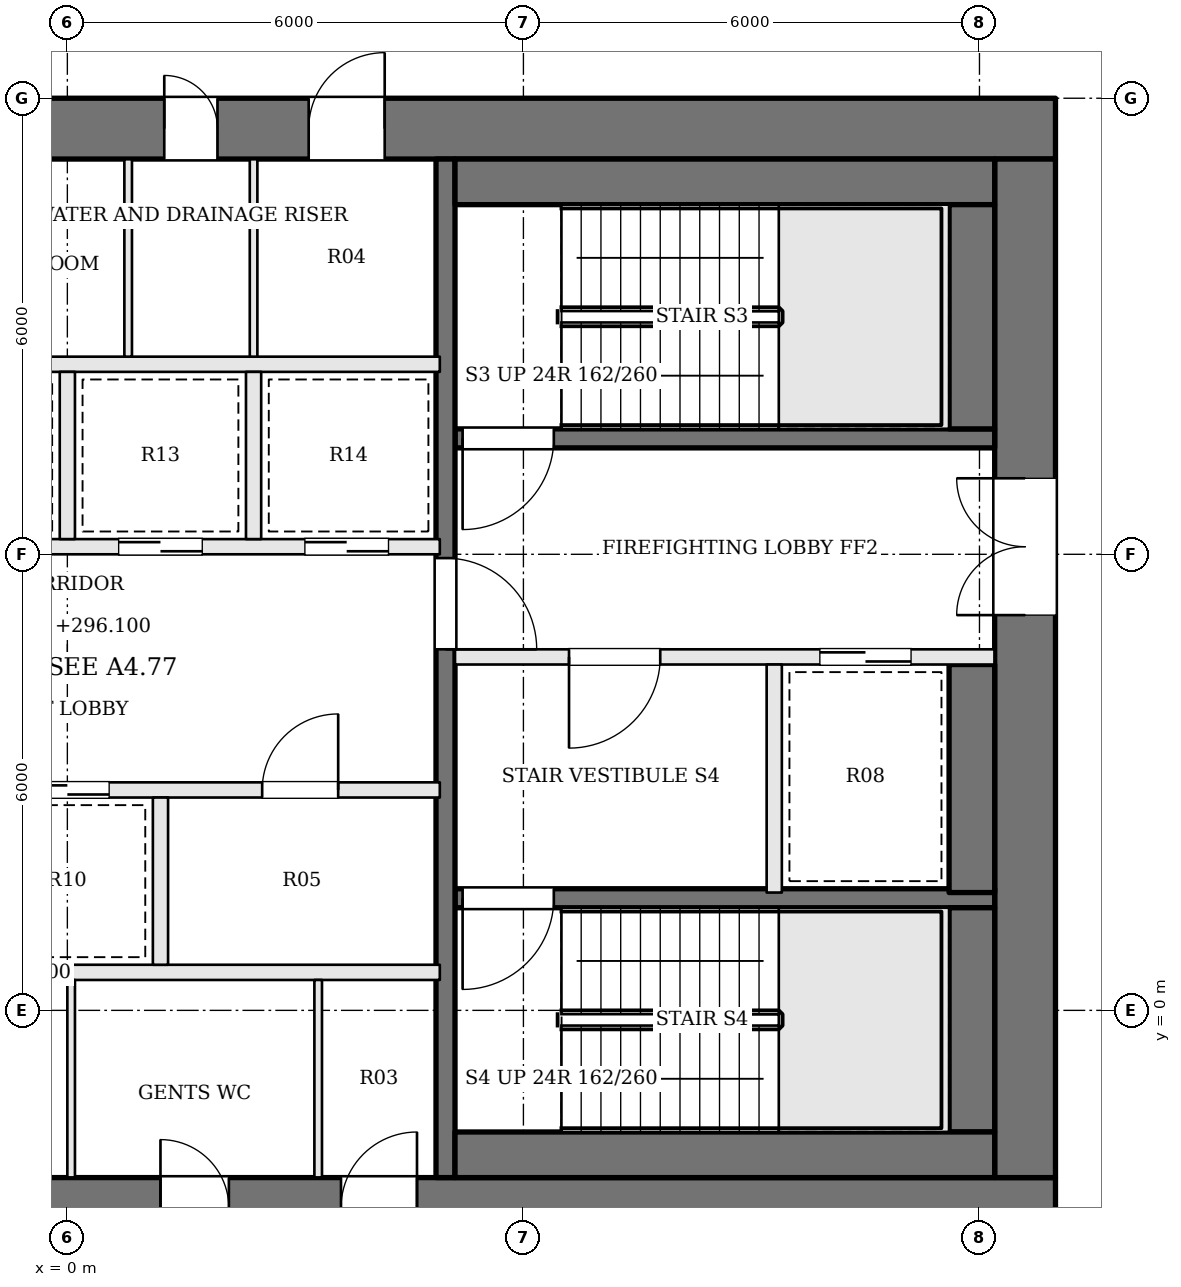
"""IFC4 building model, lengths in metres.
Left out: names, types, materials, properties, quantities, classifications, styles, units other than length and angle.
Written with IfcOpenShell. Run it as: python <this file> out.ifc"""

import sys

from ifc_helpers import new_model, si_unit, direction, frame, frame_2d, origin, place, context, subcontext, project, spatial, rectangle, extrude, element, fill, save


model = new_model("IFC4")
c1 = context("Model", 3, precision=1e-05, world=origin(), true_north=direction((0.0, 1.0)))
c2 = subcontext(c1, "Body", "Model", "MODEL_VIEW")
j1 = project(units=[si_unit("LENGTHUNIT", "METRE"), si_unit("PLANEANGLEUNIT", "RADIAN")], contexts=[c1])
p1 = place(None, origin())
s1 = spatial("IfcSite", under=j1, at=p1, CompositionType="ELEMENT")
p2 = place(p1, origin())
s2 = spatial("IfcBuilding", under=s1, at=p2, CompositionType="ELEMENT")
p3 = place(p2, frame((0.0, 0.0, 296.1)))
s3 = spatial("IfcBuildingStorey", under=s2, at=p3, CompositionType="ELEMENT", Elevation=296.1)
p4 = place(p3, frame((-13.0, 11.6, 0.0), z_axis=(0.0, 0.0, 1.0), x_axis=(1.0, 0.0, 0.0)))
e1 = element("IfcWall", 1, at=p4, inside=s3, PredefinedType="SHEAR", context=c2, shape_type="SweptSolid", body=[
    extrude(rectangle(XDim=26.0, YDim=0.8, at=frame_2d((13.0, 0.0))), origin(), (0.0, 0.0, 1.0), 3.9),
])
p5 = place(p4, frame((8.825, 0.0, 0.0)))
e2 = element("IfcOpeningElement", 2, at=p5, cuts=e1, PredefinedType="OPENING", context=c2, shape_type="SweptSolid", body=[
    extrude(rectangle(XDim=1.0, YDim=2.1, at=frame_2d((0.5, 1.05))), frame((0.0, 0.41, 0.0), z_axis=(0.0, -1.0, 0.0), x_axis=(1.0, 0.0, 0.0)), (0.0, 0.0, 1.0), 0.82),
])
p6 = place(p4, frame((11.825, 0.0, 0.0)))
e3 = element("IfcOpeningElement", 3, at=p6, cuts=e1, PredefinedType="OPENING", context=c2, shape_type="SweptSolid", body=[
    extrude(rectangle(XDim=0.7, YDim=2.1, at=frame_2d((0.35, 1.05))), frame((0.0, 0.41, 0.0), z_axis=(0.0, -1.0, 0.0), x_axis=(1.0, 0.0, 0.0)), (0.0, 0.0, 1.0), 0.82),
])
p7 = place(p4, frame((14.275, 0.0, 0.0)))
e4 = element("IfcOpeningElement", 4, at=p7, cuts=e1, PredefinedType="OPENING", context=c2, shape_type="SweptSolid", body=[
    extrude(rectangle(XDim=0.7, YDim=2.1, at=frame_2d((0.35, 1.05))), frame((0.0, 0.41, 0.0), z_axis=(0.0, -1.0, 0.0), x_axis=(1.0, 0.0, 0.0)), (0.0, 0.0, 1.0), 0.82),
])
p8 = place(p4, frame((16.175, 0.0, 0.0)))
e5 = element("IfcOpeningElement", 5, at=p8, cuts=e1, PredefinedType="OPENING", context=c2, shape_type="SweptSolid", body=[
    extrude(rectangle(XDim=1.0, YDim=2.1, at=frame_2d((0.5, 1.05))), frame((0.0, 0.41, 0.0), z_axis=(0.0, -1.0, 0.0), x_axis=(1.0, 0.0, 0.0)), (0.0, 0.0, 1.0), 0.82),
])
p9 = place(p3, frame((-13.0, -2.6, 0.0), z_axis=(0.0, 0.0, 1.0), x_axis=(1.0, 0.0, 0.0)))
e6 = element("IfcWall", 6, at=p9, inside=s3, PredefinedType="SHEAR", context=c2, shape_type="SweptSolid", body=[
    extrude(rectangle(XDim=26.0, YDim=0.8, at=frame_2d((13.0, 0.0))), origin(), (0.0, 0.0, 1.0), 3.9),
])
p10 = place(p9, frame((8.5, 0.0, 0.0)))
e7 = element("IfcOpeningElement", 7, at=p10, cuts=e6, PredefinedType="OPENING", context=c2, shape_type="SweptSolid", body=[
    extrude(rectangle(XDim=1.0, YDim=2.1, at=frame_2d((0.5, 1.05))), frame((0.0, 0.41, 0.0), z_axis=(0.0, -1.0, 0.0), x_axis=(1.0, 0.0, 0.0)), (0.0, 0.0, 1.0), 0.82),
])
p11 = place(p9, frame((11.025, 0.0, 0.0)))
e8 = element("IfcOpeningElement", 8, at=p11, cuts=e6, PredefinedType="OPENING", context=c2, shape_type="SweptSolid", body=[
    extrude(rectangle(XDim=0.9, YDim=2.1, at=frame_2d((0.45, 1.05))), frame((0.0, 0.41, 0.0), z_axis=(0.0, -1.0, 0.0), x_axis=(1.0, 0.0, 0.0)), (0.0, 0.0, 1.0), 0.82),
])
p12 = place(p9, frame((14.225, 0.0, 0.0)))
e9 = element("IfcOpeningElement", 9, at=p12, cuts=e6, PredefinedType="OPENING", context=c2, shape_type="SweptSolid", body=[
    extrude(rectangle(XDim=0.9, YDim=2.1, at=frame_2d((0.45, 1.05))), frame((0.0, 0.41, 0.0), z_axis=(0.0, -1.0, 0.0), x_axis=(1.0, 0.0, 0.0)), (0.0, 0.0, 1.0), 0.82),
])
p13 = place(p9, frame((16.6, 0.0, 0.0)))
e10 = element("IfcOpeningElement", 10, at=p13, cuts=e6, PredefinedType="OPENING", context=c2, shape_type="SweptSolid", body=[
    extrude(rectangle(XDim=1.0, YDim=2.1, at=frame_2d((0.5, 1.05))), frame((0.0, 0.41, 0.0), z_axis=(0.0, -1.0, 0.0), x_axis=(1.0, 0.0, 0.0)), (0.0, 0.0, 1.0), 0.82),
])
p14 = place(p3, frame((12.6, -2.2, 0.0), z_axis=(0.0, 0.0, 1.0), x_axis=(0.0, 1.0, 0.0)))
e11 = element("IfcWall", 11, at=p14, inside=s3, PredefinedType="SHEAR", context=c2, shape_type="SweptSolid", body=[
    extrude(rectangle(XDim=13.4, YDim=0.8, at=frame_2d((6.7, 0.0))), origin(), (0.0, 0.0, 1.0), 3.9),
])
p15 = place(p14, frame((7.4, 0.0, 0.0)))
e12 = element("IfcOpeningElement", 12, at=p15, cuts=e11, PredefinedType="OPENING", context=c2, shape_type="SweptSolid", body=[
    extrude(rectangle(XDim=1.8, YDim=2.1, at=frame_2d((0.9, 1.05))), frame((0.0, 0.41, 0.0), z_axis=(0.0, -1.0, 0.0), x_axis=(1.0, 0.0, 0.0)), (0.0, 0.0, 1.0), 0.82),
])
p16 = place(p3, frame((12.2, 7.525, 0.0), z_axis=(0.0, 0.0, 1.0), x_axis=(-1.0, 0.0, 0.0)))
e13 = element("IfcWall", 13, at=p16, inside=s3, PredefinedType="SOLIDWALL", context=c2, shape_type="SweptSolid", body=[
    extrude(rectangle(XDim=7.1, YDim=0.25, at=frame_2d((3.55, 0.0))), origin(), (0.0, 0.0, 1.0), 3.7),
])
p17 = place(p16, frame((5.8, 0.0, 0.0)))
e14 = element("IfcOpeningElement", 14, at=p17, cuts=e13, PredefinedType="OPENING", context=c2, shape_type="SweptSolid", body=[
    extrude(rectangle(XDim=1.2, YDim=2.1, at=frame_2d((0.6, 1.05))), frame((0.0, 0.135, 0.0), z_axis=(0.0, -1.0, 0.0), x_axis=(1.0, 0.0, 0.0)), (0.0, 0.0, 1.0), 0.27),
])
p18 = place(p3, frame((12.2, 4.65, 0.0), z_axis=(0.0, 0.0, 1.0), x_axis=(-1.0, 0.0, 0.0)))
e15 = element("IfcWall", 15, at=p18, inside=s3, PredefinedType="SOLIDWALL", context=c2, shape_type="SweptSolid", body=[
    extrude(rectangle(XDim=7.1, YDim=0.2, at=frame_2d((3.55, 0.0))), origin(), (0.0, 0.0, 1.0), 3.7),
])
p19 = place(p18, frame((4.4, 0.0, 0.0)))
e16 = element("IfcOpeningElement", 16, at=p19, cuts=e15, PredefinedType="OPENING", context=c2, shape_type="SweptSolid", body=[
    extrude(rectangle(XDim=1.2, YDim=2.1, at=frame_2d((0.6, 1.05))), frame((0.0, 0.11, 0.0), z_axis=(0.0, -1.0, 0.0), x_axis=(1.0, 0.0, 0.0)), (0.0, 0.0, 1.0), 0.22),
])
p20 = place(p18, frame((1.1, 0.0, 0.0)))
e17 = element("IfcOpeningElement", 17, at=p20, cuts=e15, PredefinedType="OPENING", context=c2, shape_type="SweptSolid", body=[
    extrude(rectangle(XDim=1.2, YDim=2.1, at=frame_2d((0.6, 1.05))), frame((0.0, 0.11, 0.0), z_axis=(0.0, -1.0, 0.0), x_axis=(1.0, 0.0, 0.0)), (0.0, 0.0, 1.0), 0.22),
])
p21 = place(p3, frame((12.2, 1.475, 0.0), z_axis=(0.0, 0.0, 1.0), x_axis=(-1.0, 0.0, 0.0)))
e18 = element("IfcWall", 18, at=p21, inside=s3, PredefinedType="SOLIDWALL", context=c2, shape_type="SweptSolid", body=[
    extrude(rectangle(XDim=7.1, YDim=0.25, at=frame_2d((3.55, 0.0))), origin(), (0.0, 0.0, 1.0), 3.7),
])
p22 = place(p21, frame((5.8, 0.0, 0.0)))
e19 = element("IfcOpeningElement", 19, at=p22, cuts=e18, PredefinedType="OPENING", context=c2, shape_type="SweptSolid", body=[
    extrude(rectangle(XDim=1.2, YDim=2.1, at=frame_2d((0.6, 1.05))), frame((0.0, 0.135, 0.0), z_axis=(0.0, -1.0, 0.0), x_axis=(1.0, 0.0, 0.0)), (0.0, 0.0, 1.0), 0.27),
])
p23 = place(p3, frame((9.3, 4.55, 0.0), z_axis=(0.0, 0.0, 1.0), x_axis=(0.0, -1.0, 0.0)))
e20 = element("IfcWall", 20, at=p23, inside=s3, PredefinedType="SOLIDWALL", context=c2, shape_type="SweptSolid", body=[
    extrude(rectangle(XDim=3.0, YDim=0.2, at=frame_2d((1.5, 0.0))), origin(), (0.0, 0.0, 1.0), 3.7),
])
p24 = place(p3, frame((4.975, 11.2, 0.0), z_axis=(0.0, 0.0, 1.0), x_axis=(0.0, -1.0, 0.0)))
e21 = element("IfcWall", 21, at=p24, inside=s3, PredefinedType="SOLIDWALL", context=c2, shape_type="SweptSolid", body=[
    extrude(rectangle(XDim=13.4, YDim=0.25, at=frame_2d((6.7, 0.0))), origin(), (0.0, 0.0, 1.0), 3.7),
])
p25 = place(p24, frame((5.25, 0.0, 0.0)))
e22 = element("IfcOpeningElement", 22, at=p25, cuts=e21, PredefinedType="OPENING", context=c2, shape_type="SweptSolid", body=[
    extrude(rectangle(XDim=1.2, YDim=2.1, at=frame_2d((0.6, 1.05))), frame((0.0, 0.135, 0.0), z_axis=(0.0, -1.0, 0.0), x_axis=(1.0, 0.0, 0.0)), (0.0, 0.0, 1.0), 0.27),
])
p26 = place(p3, frame((12.2, 10.9, 0.0), z_axis=(0.0, 0.0, 1.0), x_axis=(-1.0, 0.0, 0.0)))
e23 = element("IfcWall", 23, at=p26, inside=s3, PredefinedType="SOLIDWALL", context=c2, shape_type="SweptSolid", body=[
    extrude(rectangle(XDim=7.1, YDim=0.6, at=frame_2d((3.55, 0.0))), origin(), (0.0, 0.0, 1.0), 3.7),
])
p27 = place(p3, frame((11.9, 10.6, 0.0), z_axis=(0.0, 0.0, 1.0), x_axis=(0.0, -1.0, 0.0)))
e24 = element("IfcWall", 24, at=p27, inside=s3, PredefinedType="SOLIDWALL", context=c2, shape_type="SweptSolid", body=[
    extrude(rectangle(XDim=2.95, YDim=0.6, at=frame_2d((1.475, 0.0))), origin(), (0.0, 0.0, 1.0), 3.7),
])
p28 = place(p3, frame((11.9, 4.55, 0.0), z_axis=(0.0, 0.0, 1.0), x_axis=(0.0, -1.0, 0.0)))
e25 = element("IfcWall", 25, at=p28, inside=s3, PredefinedType="SOLIDWALL", context=c2, shape_type="SweptSolid", body=[
    extrude(rectangle(XDim=3.0, YDim=0.6, at=frame_2d((1.5, 0.0))), origin(), (0.0, 0.0, 1.0), 3.7),
])
p29 = place(p3, frame((11.9, 1.35, 0.0), z_axis=(0.0, 0.0, 1.0), x_axis=(0.0, -1.0, 0.0)))
e26 = element("IfcWall", 26, at=p29, inside=s3, PredefinedType="SOLIDWALL", context=c2, shape_type="SweptSolid", body=[
    extrude(rectangle(XDim=2.95, YDim=0.6, at=frame_2d((1.475, 0.0))), origin(), (0.0, 0.0, 1.0), 3.7),
])
p30 = place(p3, frame((12.2, -1.9, 0.0), z_axis=(0.0, 0.0, 1.0), x_axis=(-1.0, 0.0, 0.0)))
e27 = element("IfcWall", 27, at=p30, inside=s3, PredefinedType="SOLIDWALL", context=c2, shape_type="SweptSolid", body=[
    extrude(rectangle(XDim=7.1, YDim=0.6, at=frame_2d((3.55, 0.0))), origin(), (0.0, 0.0, 1.0), 3.7),
])
p31 = place(p3, frame((-4.9, 0.5, 0.0), z_axis=(0.0, 0.0, 1.0), x_axis=(1.0, 0.0, 0.0)))
e28 = element("IfcWall", 28, at=p31, inside=s3, PredefinedType="SOLIDWALL", context=c2, shape_type="SweptSolid", body=[
    extrude(rectangle(XDim=9.8, YDim=0.2, at=frame_2d((4.9, 0.0))), origin(), (0.0, 0.0, 1.0), 3.7),
])
p32 = place(p3, frame((-4.9, 2.9, 0.0), z_axis=(0.0, 0.0, 1.0), x_axis=(1.0, 0.0, 0.0)))
e29 = element("IfcWall", 29, at=p32, inside=s3, PredefinedType="SOLIDWALL", context=c2, shape_type="SweptSolid", body=[
    extrude(rectangle(XDim=9.8, YDim=0.2, at=frame_2d((4.9, 0.0))), origin(), (0.0, 0.0, 1.0), 3.7),
])
p33 = place(p32, frame((0.675, 0.0, 0.0)))
e30 = element("IfcOpeningElement", 30, at=p33, cuts=e29, PredefinedType="OPENING", context=c2, shape_type="SweptSolid", body=[
    extrude(rectangle(XDim=1.1, YDim=2.1, at=frame_2d((0.55, 1.05))), frame((0.0, 0.11, 0.0), z_axis=(0.0, -1.0, 0.0), x_axis=(1.0, 0.0, 0.0)), (0.0, 0.0, 1.0), 0.22),
])
p34 = place(p32, frame((2.613, 0.0, 0.0)))
e31 = element("IfcOpeningElement", 31, at=p34, cuts=e29, PredefinedType="OPENING", context=c2, shape_type="SweptSolid", body=[
    extrude(rectangle(XDim=0.9, YDim=2.1, at=frame_2d((0.45, 1.05))), frame((0.0, 0.11, 0.0), z_axis=(0.0, -1.0, 0.0), x_axis=(1.0, 0.0, 0.0)), (0.0, 0.0, 1.0), 0.22),
])
p35 = place(p32, frame((4.35, 0.0, 0.0)))
e32 = element("IfcOpeningElement", 32, at=p35, cuts=e29, PredefinedType="OPENING", context=c2, shape_type="SweptSolid", body=[
    extrude(rectangle(XDim=1.1, YDim=2.1, at=frame_2d((0.55, 1.05))), frame((0.0, 0.11, 0.0), z_axis=(0.0, -1.0, 0.0), x_axis=(1.0, 0.0, 0.0)), (0.0, 0.0, 1.0), 0.22),
])
p36 = place(p32, frame((7.463, 0.0, 0.0)))
e33 = element("IfcOpeningElement", 33, at=p36, cuts=e29, PredefinedType="OPENING", context=c2, shape_type="SweptSolid", body=[
    extrude(rectangle(XDim=1.0, YDim=2.1, at=frame_2d((0.5, 1.05))), frame((0.0, 0.11, 0.0), z_axis=(0.0, -1.0, 0.0), x_axis=(1.0, 0.0, 0.0)), (0.0, 0.0, 1.0), 0.22),
])
p37 = place(p3, frame((-4.9, 6.1, 0.0), z_axis=(0.0, 0.0, 1.0), x_axis=(1.0, 0.0, 0.0)))
e34 = element("IfcWall", 34, at=p37, inside=s3, PredefinedType="SOLIDWALL", context=c2, shape_type="SweptSolid", body=[
    extrude(rectangle(XDim=9.8, YDim=0.2, at=frame_2d((4.9, 0.0))), origin(), (0.0, 0.0, 1.0), 3.7),
])
p38 = place(p37, frame((0.675, 0.0, 0.0)))
e35 = element("IfcOpeningElement", 35, at=p38, cuts=e34, PredefinedType="OPENING", context=c2, shape_type="SweptSolid", body=[
    extrude(rectangle(XDim=1.1, YDim=2.1, at=frame_2d((0.55, 1.05))), frame((0.0, 0.11, 0.0), z_axis=(0.0, -1.0, 0.0), x_axis=(1.0, 0.0, 0.0)), (0.0, 0.0, 1.0), 0.22),
])
p39 = place(p37, frame((3.125, 0.0, 0.0)))
e36 = element("IfcOpeningElement", 36, at=p39, cuts=e34, PredefinedType="OPENING", context=c2, shape_type="SweptSolid", body=[
    extrude(rectangle(XDim=1.1, YDim=2.1, at=frame_2d((0.55, 1.05))), frame((0.0, 0.11, 0.0), z_axis=(0.0, -1.0, 0.0), x_axis=(1.0, 0.0, 0.0)), (0.0, 0.0, 1.0), 0.22),
])
p40 = place(p37, frame((5.575, 0.0, 0.0)))
e37 = element("IfcOpeningElement", 37, at=p40, cuts=e34, PredefinedType="OPENING", context=c2, shape_type="SweptSolid", body=[
    extrude(rectangle(XDim=1.1, YDim=2.1, at=frame_2d((0.55, 1.05))), frame((0.0, 0.11, 0.0), z_axis=(0.0, -1.0, 0.0), x_axis=(1.0, 0.0, 0.0)), (0.0, 0.0, 1.0), 0.22),
])
p41 = place(p37, frame((8.025, 0.0, 0.0)))
e38 = element("IfcOpeningElement", 38, at=p41, cuts=e34, PredefinedType="OPENING", context=c2, shape_type="SweptSolid", body=[
    extrude(rectangle(XDim=1.1, YDim=2.1, at=frame_2d((0.55, 1.05))), frame((0.0, 0.11, 0.0), z_axis=(0.0, -1.0, 0.0), x_axis=(1.0, 0.0, 0.0)), (0.0, 0.0, 1.0), 0.22),
])
p42 = place(p3, frame((-4.9, 8.5, 0.0), z_axis=(0.0, 0.0, 1.0), x_axis=(1.0, 0.0, 0.0)))
e39 = element("IfcWall", 39, at=p42, inside=s3, PredefinedType="SOLIDWALL", context=c2, shape_type="SweptSolid", body=[
    extrude(rectangle(XDim=9.8, YDim=0.2, at=frame_2d((4.9, 0.0))), origin(), (0.0, 0.0, 1.0), 3.7),
])
for number, where, z_axis, x_axis in (
    (40, (1.225, 0.6, 0.0), (0.0, 0.0, 1.0), (0.0, 1.0, 0.0)),
    (41, (0.0, 6.2, 0.0), (0.0, 0.0, 1.0), (0.0, 1.0, 0.0)),
    (42, (2.45, 6.2, 0.0), (0.0, 0.0, 1.0), (0.0, 1.0, 0.0)),
):
    element("IfcWall", number, at=place(p3, frame(where, z_axis=z_axis, x_axis=x_axis)), inside=s3, PredefinedType="SOLIDWALL", context=c2, shape_type="SweptSolid", body=[
        extrude(rectangle(XDim=2.2, YDim=0.2, at=frame_2d((1.1, 0.0))), origin(), (0.0, 0.0, 1.0), 3.7),
    ])
for number, where, z_axis, x_axis in (
    (43, (0.05, -2.2, 0.0), (0.0, 0.0, 1.0), (0.0, 1.0, 0.0)),
    (44, (3.3, -2.2, 0.0), (0.0, 0.0, 1.0), (0.0, 1.0, 0.0)),
    (45, (0.8, 8.6, 0.0), (0.0, 0.0, 1.0), (0.0, 1.0, 0.0)),
    (46, (2.45, 8.6, 0.0), (0.0, 0.0, 1.0), (0.0, 1.0, 0.0)),
):
    element("IfcWall", number, at=place(p3, frame(where, z_axis=z_axis, x_axis=x_axis)), inside=s3, PredefinedType="PARTITIONING", context=c2, shape_type="SweptSolid", body=[
        extrude(rectangle(XDim=2.6, YDim=0.1, at=frame_2d((1.3, 0.0))), origin(), (0.0, 0.0, 1.0), 3.7),
    ])
p43 = place(p15, origin())
e47 = element("IfcDoor", 47, at=p43, inside=s3, OperationType="DOUBLE_DOOR_SINGLE_SWING", PredefinedType="DOOR", context=c2, shape_type="SweptSolid", body=[
    extrude(rectangle(XDim=1.8, YDim=2.1, at=frame_2d((0.9, 1.05))), frame((0.0, 0.025, 0.0), z_axis=(0.0, -1.0, 0.0), x_axis=(1.0, 0.0, 0.0)), (0.0, 0.0, 1.0), 0.05),
])
fill(e12, e47)
p44 = place(p25, origin())
e48 = element("IfcDoor", 48, at=p44, inside=s3, OperationType="SINGLE_SWING_RIGHT", PredefinedType="DOOR", context=c2, shape_type="SweptSolid", body=[
    extrude(rectangle(XDim=1.2, YDim=2.1, at=frame_2d((0.6, 1.05))), frame((0.0, 0.025, 0.0), z_axis=(0.0, -1.0, 0.0), x_axis=(1.0, 0.0, 0.0)), (0.0, 0.0, 1.0), 0.05),
])
fill(e22, e48)
p45 = place(p19, origin())
e49 = element("IfcDoor", 49, at=p45, inside=s3, OperationType="SINGLE_SWING_RIGHT", PredefinedType="DOOR", context=c2, shape_type="SweptSolid", body=[
    extrude(rectangle(XDim=1.2, YDim=2.1, at=frame_2d((0.6, 1.05))), frame((0.0, 0.025, 0.0), z_axis=(0.0, -1.0, 0.0), x_axis=(1.0, 0.0, 0.0)), (0.0, 0.0, 1.0), 0.05),
])
fill(e16, e49)
p46 = place(p17, origin())
e50 = element("IfcDoor", 50, at=p46, inside=s3, OperationType="SINGLE_SWING_RIGHT", PredefinedType="DOOR", context=c2, shape_type="SweptSolid", body=[
    extrude(rectangle(XDim=1.2, YDim=2.1, at=frame_2d((0.6, 1.05))), frame((0.0, 0.025, 0.0), z_axis=(0.0, -1.0, 0.0), x_axis=(1.0, 0.0, 0.0)), (0.0, 0.0, 1.0), 0.05),
])
fill(e14, e50)
p47 = place(p22, origin())
e51 = element("IfcDoor", 51, at=p47, inside=s3, OperationType="SINGLE_SWING_RIGHT", PredefinedType="DOOR", context=c2, shape_type="SweptSolid", body=[
    extrude(rectangle(XDim=1.2, YDim=2.1, at=frame_2d((0.6, 1.05))), frame((0.0, 0.025, 0.0), z_axis=(0.0, -1.0, 0.0), x_axis=(1.0, 0.0, 0.0)), (0.0, 0.0, 1.0), 0.05),
])
fill(e19, e51)
p48 = place(p20, origin())
e52 = element("IfcDoor", 52, at=p48, inside=s3, OperationType="SLIDING_TO_RIGHT", PredefinedType="DOOR", context=c2, shape_type="SweptSolid", body=[
    extrude(rectangle(XDim=1.2, YDim=2.1, at=frame_2d((0.6, 1.05))), frame((0.0, 0.025, 0.0), z_axis=(0.0, -1.0, 0.0), x_axis=(1.0, 0.0, 0.0)), (0.0, 0.0, 1.0), 0.05),
])
fill(e17, e52)
p49 = place(p35, origin())
e53 = element("IfcDoor", 53, at=p49, inside=s3, OperationType="SLIDING_TO_LEFT", PredefinedType="DOOR", context=c2, shape_type="SweptSolid", body=[
    extrude(rectangle(XDim=1.1, YDim=2.1, at=frame_2d((0.55, 1.05))), frame((0.0, 0.025, 0.0), z_axis=(0.0, -1.0, 0.0), x_axis=(1.0, 0.0, 0.0)), (0.0, 0.0, 1.0), 0.05),
])
fill(e32, e53)
p50 = place(p36, origin())
e54 = element("IfcDoor", 54, at=p50, inside=s3, OperationType="SINGLE_SWING_RIGHT", PredefinedType="DOOR", context=c2, shape_type="SweptSolid", body=[
    extrude(rectangle(XDim=1.0, YDim=2.1, at=frame_2d((0.5, 1.05))), frame((0.0, 0.025, 0.0), z_axis=(0.0, -1.0, 0.0), x_axis=(1.0, 0.0, 0.0)), (0.0, 0.0, 1.0), 0.05),
])
fill(e33, e54)
p51 = place(p40, origin())
e55 = element("IfcDoor", 55, at=p51, inside=s3, OperationType="SLIDING_TO_RIGHT", PredefinedType="DOOR", context=c2, shape_type="SweptSolid", body=[
    extrude(rectangle(XDim=1.1, YDim=2.1, at=frame_2d((0.55, 1.05))), frame((0.0, 0.025, 0.0), z_axis=(0.0, -1.0, 0.0), x_axis=(1.0, 0.0, 0.0)), (0.0, 0.0, 1.0), 0.05),
])
fill(e37, e55)
p52 = place(p41, origin())
e56 = element("IfcDoor", 56, at=p52, inside=s3, OperationType="SLIDING_TO_LEFT", PredefinedType="DOOR", context=c2, shape_type="SweptSolid", body=[
    extrude(rectangle(XDim=1.1, YDim=2.1, at=frame_2d((0.55, 1.05))), frame((0.0, 0.025, 0.0), z_axis=(0.0, -1.0, 0.0), x_axis=(1.0, 0.0, 0.0)), (0.0, 0.0, 1.0), 0.05),
])
fill(e38, e56)
p53 = place(p12, origin())
e57 = element("IfcDoor", 57, at=p53, inside=s3, OperationType="SINGLE_SWING_LEFT", PredefinedType="DOOR", context=c2, shape_type="SweptSolid", body=[
    extrude(rectangle(XDim=0.9, YDim=2.1, at=frame_2d((0.45, 1.05))), frame((0.0, 0.025, 0.0), z_axis=(0.0, -1.0, 0.0), x_axis=(1.0, 0.0, 0.0)), (0.0, 0.0, 1.0), 0.05),
])
fill(e9, e57)
p54 = place(p13, origin())
e58 = element("IfcDoor", 58, at=p54, inside=s3, OperationType="SINGLE_SWING_RIGHT", PredefinedType="DOOR", context=c2, shape_type="SweptSolid", body=[
    extrude(rectangle(XDim=1.0, YDim=2.1, at=frame_2d((0.5, 1.05))), frame((0.0, 0.025, 0.0), z_axis=(0.0, -1.0, 0.0), x_axis=(1.0, 0.0, 0.0)), (0.0, 0.0, 1.0), 0.05),
])
fill(e10, e58)
p55 = place(p7, origin())
e59 = element("IfcDoor", 59, at=p55, inside=s3, OperationType="SINGLE_SWING_LEFT", PredefinedType="DOOR", context=c2, shape_type="SweptSolid", body=[
    extrude(rectangle(XDim=0.7, YDim=2.1, at=frame_2d((0.35, 1.05))), frame((0.0, 0.025, 0.0), z_axis=(0.0, -1.0, 0.0), x_axis=(1.0, 0.0, 0.0)), (0.0, 0.0, 1.0), 0.05),
])
fill(e4, e59)
p56 = place(p8, origin())
e60 = element("IfcDoor", 60, at=p56, inside=s3, OperationType="SINGLE_SWING_RIGHT", PredefinedType="DOOR", context=c2, shape_type="SweptSolid", body=[
    extrude(rectangle(XDim=1.0, YDim=2.1, at=frame_2d((0.5, 1.05))), frame((0.0, 0.025, 0.0), z_axis=(0.0, -1.0, 0.0), x_axis=(1.0, 0.0, 0.0)), (0.0, 0.0, 1.0), 0.05),
])
fill(e5, e60)
save(model, sys.argv[1])
